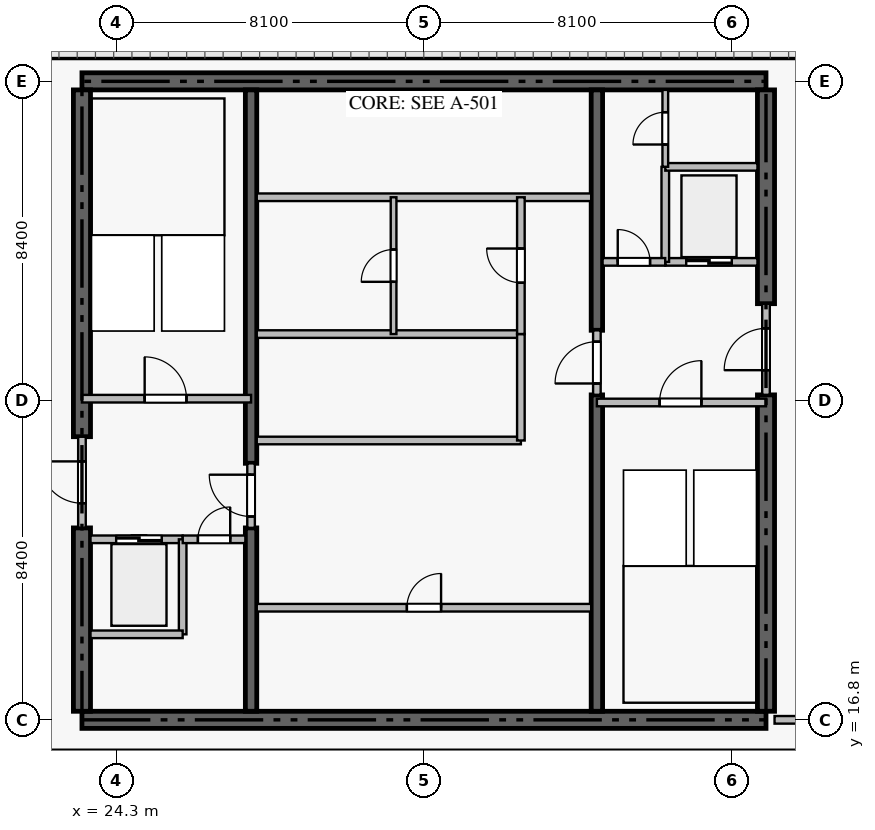
"""IFC4 building model, lengths in metres.
Left out: names, types, materials, properties, quantities, classifications, styles, units other than length and angle.
Written with IfcOpenShell. Run it as: python <this file> out.ifc"""

import sys

from ifc_helpers import new_model, si_unit, direction, frame, frame_2d, origin, place, context, subcontext, project, spatial, rectangle, extrude, source, transform, mapped, element, fill, save


model = new_model("IFC4")
c1 = context("Model", 3, precision=1e-05, world=origin(), true_north=direction((0.0, 1.0)))
c2 = subcontext(c1, "Body", "Model", "MODEL_VIEW")
j1 = project(units=[si_unit("LENGTHUNIT", "METRE"), si_unit("PLANEANGLEUNIT", "RADIAN")], contexts=[c1])
p1 = place(None, origin())
s1 = spatial("IfcSite", under=j1, at=p1, CompositionType="ELEMENT")
p2 = place(p1, origin())
s2 = spatial("IfcBuilding", under=s1, at=p2, CompositionType="ELEMENT")
p3 = place(p2, frame((0.0, 0.0, -10.8)))
s3 = spatial("IfcBuildingStorey", under=s2, at=p3, CompositionType="ELEMENT", Elevation=-10.8)
for number, where, z_axis, x_axis in (
    (1, (23.4, 16.8, 0.0), (0.0, 0.0, 1.0), (1.0, 0.0, 0.0)),
    (2, (41.4, 33.6, 0.0), (0.0, 0.0, 1.0), (-1.0, 0.0, 0.0)),
):
    element("IfcWall", number, at=place(p3, frame(where, z_axis=z_axis, x_axis=x_axis)), inside=s3, PredefinedType="SHEAR", context=c2, shape_type="SweptSolid", body=[
        extrude(rectangle(XDim=18.0, YDim=0.45, at=frame_2d((9.0, 0.0))), origin(), (0.0, 0.0, 1.0), 3.238),
    ])
p4 = place(p3, frame((23.4, 17.025, 0.0), z_axis=(0.0, 0.0, 1.0), x_axis=(0.0, 1.0, 0.0)))
e3 = element("IfcWall", 3, at=p4, inside=s3, PredefinedType="SHEAR", context=c2, shape_type="SweptSolid", body=[
    extrude(rectangle(XDim=4.825, YDim=0.45, at=frame_2d((2.413, 0.0))), origin(), (0.0, 0.0, 1.0), 3.238),
])
p5 = place(p3, frame((23.4, 24.25, 0.0), z_axis=(0.0, 0.0, 1.0), x_axis=(0.0, 1.0, 0.0)))
e4 = element("IfcWall", 4, at=p5, inside=s3, PredefinedType="SHEAR", context=c2, shape_type="SweptSolid", body=[
    extrude(rectangle(XDim=9.125, YDim=0.45, at=frame_2d((4.562, 0.0))), origin(), (0.0, 0.0, 1.0), 3.238),
])
p6 = place(p3, frame((41.4, 17.025, 0.0), z_axis=(0.0, 0.0, 1.0), x_axis=(0.0, 1.0, 0.0)))
e5 = element("IfcWall", 5, at=p6, inside=s3, PredefinedType="SHEAR", context=c2, shape_type="SweptSolid", body=[
    extrude(rectangle(XDim=8.325, YDim=0.45, at=frame_2d((4.163, 0.0))), origin(), (0.0, 0.0, 1.0), 3.238),
])
p7 = place(p3, frame((41.4, 27.75, 0.0), z_axis=(0.0, 0.0, 1.0), x_axis=(0.0, 1.0, 0.0)))
e6 = element("IfcWall", 6, at=p7, inside=s3, PredefinedType="SHEAR", context=c2, shape_type="SweptSolid", body=[
    extrude(rectangle(XDim=5.625, YDim=0.45, at=frame_2d((2.812, 0.0))), origin(), (0.0, 0.0, 1.0), 3.238),
])
p8 = place(p3, frame((27.85, 17.025, 0.0), z_axis=(0.0, 0.0, 1.0), x_axis=(0.0, 1.0, 0.0)))
e7 = element("IfcWall", 7, at=p8, inside=s3, PredefinedType="SHEAR", context=c2, shape_type="SweptSolid", body=[
    extrude(rectangle(XDim=4.825, YDim=0.3, at=frame_2d((2.413, 0.0))), origin(), (0.0, 0.0, 1.0), 3.238),
])
p9 = place(p3, frame((27.85, 23.55, 0.0), z_axis=(0.0, 0.0, 1.0), x_axis=(0.0, 1.0, 0.0)))
e8 = element("IfcWall", 8, at=p9, inside=s3, PredefinedType="SHEAR", context=c2, shape_type="SweptSolid", body=[
    extrude(rectangle(XDim=9.825, YDim=0.3, at=frame_2d((4.913, 0.0))), origin(), (0.0, 0.0, 1.0), 3.238),
])
p10 = place(p3, frame((36.95, 17.025, 0.0), z_axis=(0.0, 0.0, 1.0), x_axis=(0.0, 1.0, 0.0)))
e9 = element("IfcWall", 9, at=p10, inside=s3, PredefinedType="SHEAR", context=c2, shape_type="SweptSolid", body=[
    extrude(rectangle(XDim=8.325, YDim=0.3, at=frame_2d((4.163, 0.0))), origin(), (0.0, 0.0, 1.0), 3.238),
])
p11 = place(p3, frame((36.95, 27.05, 0.0), z_axis=(0.0, 0.0, 1.0), x_axis=(0.0, 1.0, 0.0)))
e10 = element("IfcWall", 10, at=p11, inside=s3, PredefinedType="SHEAR", context=c2, shape_type="SweptSolid", body=[
    extrude(rectangle(XDim=6.325, YDim=0.3, at=frame_2d((3.163, 0.0))), origin(), (0.0, 0.0, 1.0), 3.238),
])
p12 = place(p3, frame((23.4, 25.25, 0.0), z_axis=(0.0, 0.0, 1.0), x_axis=(1.0, 0.0, 0.0)))
e11 = element("IfcWall", 11, at=p12, inside=s3, PredefinedType="STANDARD", context=c2, shape_type="SweptSolid", body=[
    extrude(rectangle(XDim=4.45, YDim=0.2, at=frame_2d((2.225, 0.0))), origin(), (0.0, 0.0, 1.0), 3.24),
])
p13 = place(p12, frame((1.65, 0.0, 0.0)))
e12 = element("IfcOpeningElement", 12, at=p13, cuts=e11, PredefinedType="OPENING", context=c2, shape_type="SweptSolid", body=[
    extrude(rectangle(XDim=1.1, YDim=2.15, at=frame_2d((0.55, 1.075))), frame((0.0, 0.11, 0.0), z_axis=(0.0, -1.0, 0.0), x_axis=(1.0, 0.0, 0.0)), (0.0, 0.0, 1.0), 0.22),
])
p14 = place(p3, frame((36.95, 25.15, 0.0), z_axis=(0.0, 0.0, 1.0), x_axis=(1.0, 0.0, 0.0)))
e13 = element("IfcWall", 13, at=p14, inside=s3, PredefinedType="STANDARD", context=c2, shape_type="SweptSolid", body=[
    extrude(rectangle(XDim=4.45, YDim=0.2, at=frame_2d((2.225, 0.0))), origin(), (0.0, 0.0, 1.0), 3.24),
])
p15 = place(p14, frame((1.65, 0.0, 0.0)))
e14 = element("IfcOpeningElement", 14, at=p15, cuts=e13, PredefinedType="OPENING", context=c2, shape_type="SweptSolid", body=[
    extrude(rectangle(XDim=1.1, YDim=2.15, at=frame_2d((0.55, 1.075))), frame((0.0, 0.11, 0.0), z_axis=(0.0, -1.0, 0.0), x_axis=(1.0, 0.0, 0.0)), (0.0, 0.0, 1.0), 0.22),
])
p16 = place(p3, frame((23.625, 21.55, 0.0), z_axis=(0.0, 0.0, 1.0), x_axis=(1.0, 0.0, 0.0)))
e15 = element("IfcWall", 15, at=p16, inside=s3, PredefinedType="STANDARD", context=c2, shape_type="SweptSolid", body=[
    extrude(rectangle(XDim=2.425, YDim=0.2, at=frame_2d((1.212, 0.0))), origin(), (0.0, 0.0, 1.0), 3.24),
])
p17 = place(p16, frame((0.675, 0.0, 0.0)))
e16 = element("IfcOpeningElement", 16, at=p17, cuts=e15, PredefinedType="OPENING", context=c2, shape_type="SweptSolid", body=[
    extrude(rectangle(XDim=1.2, YDim=2.2, at=frame_2d((0.6, 1.1))), frame((0.0, 0.11, 0.0), z_axis=(0.0, -1.0, 0.0), x_axis=(1.0, 0.0, 0.0)), (0.0, 0.0, 1.0), 0.22),
])
p18 = place(p3, frame((38.75, 28.85, 0.0), z_axis=(0.0, 0.0, 1.0), x_axis=(1.0, 0.0, 0.0)))
e17 = element("IfcWall", 17, at=p18, inside=s3, PredefinedType="STANDARD", context=c2, shape_type="SweptSolid", body=[
    extrude(rectangle(XDim=2.425, YDim=0.2, at=frame_2d((1.212, 0.0))), origin(), (0.0, 0.0, 1.0), 3.24),
])
p19 = place(p18, frame((0.55, 0.0, 0.0)))
e18 = element("IfcOpeningElement", 18, at=p19, cuts=e17, PredefinedType="OPENING", context=c2, shape_type="SweptSolid", body=[
    extrude(rectangle(XDim=1.2, YDim=2.2, at=frame_2d((0.6, 1.1))), frame((0.0, 0.11, 0.0), z_axis=(0.0, -1.0, 0.0), x_axis=(1.0, 0.0, 0.0)), (0.0, 0.0, 1.0), 0.22),
])
p20 = place(p3, frame((26.05, 19.05, 0.0), z_axis=(0.0, 0.0, 1.0), x_axis=(0.0, 1.0, 0.0)))
e19 = element("IfcWall", 19, at=p20, inside=s3, PredefinedType="STANDARD", context=c2, shape_type="SweptSolid", body=[
    extrude(rectangle(XDim=2.5, YDim=0.2, at=frame_2d((1.25, 0.0))), origin(), (0.0, 0.0, 1.0), 3.24),
])
p21 = place(p3, frame((23.625, 19.05, 0.0), z_axis=(0.0, 0.0, 1.0), x_axis=(1.0, 0.0, 0.0)))
e20 = element("IfcWall", 20, at=p21, inside=s3, PredefinedType="STANDARD", context=c2, shape_type="SweptSolid", body=[
    extrude(rectangle(XDim=2.425, YDim=0.2, at=frame_2d((1.212, 0.0))), origin(), (0.0, 0.0, 1.0), 3.24),
])
p22 = place(p3, frame((26.052, 21.55, 0.0), z_axis=(0.0, 0.0, 1.0), x_axis=(1.0, 0.0, 0.0)))
e21 = element("IfcWall", 21, at=p22, inside=s3, PredefinedType="STANDARD", context=c2, shape_type="SweptSolid", body=[
    extrude(rectangle(XDim=1.648, YDim=0.2, at=frame_2d((0.824, 0.0))), origin(), (0.0, 0.0, 1.0), 3.24),
])
p23 = place(p22, frame((0.399, 0.0, 0.0)))
e22 = element("IfcOpeningElement", 22, at=p23, cuts=e21, PredefinedType="OPENING", context=c2, shape_type="SweptSolid", body=[
    extrude(rectangle(XDim=0.85, YDim=2.1, at=frame_2d((0.425, 1.05))), frame((0.0, 0.11, 0.0), z_axis=(0.0, -1.0, 0.0), x_axis=(1.0, 0.0, 0.0)), (0.0, 0.0, 1.0), 0.22),
])
p24 = place(p3, frame((38.75, 28.85, 0.0), z_axis=(0.0, 0.0, 1.0), x_axis=(0.0, 1.0, 0.0)))
e23 = element("IfcWall", 23, at=p24, inside=s3, PredefinedType="STANDARD", context=c2, shape_type="SweptSolid", body=[
    extrude(rectangle(XDim=2.5, YDim=0.2, at=frame_2d((1.25, 0.0))), origin(), (0.0, 0.0, 1.0), 3.24),
])
p25 = place(p3, frame((38.75, 31.35, 0.0), z_axis=(0.0, 0.0, 1.0), x_axis=(1.0, 0.0, 0.0)))
e24 = element("IfcWall", 24, at=p25, inside=s3, PredefinedType="STANDARD", context=c2, shape_type="SweptSolid", body=[
    extrude(rectangle(XDim=2.425, YDim=0.2, at=frame_2d((1.212, 0.0))), origin(), (0.0, 0.0, 1.0), 3.24),
])
p26 = place(p3, frame((37.1, 28.85, 0.0), z_axis=(0.0, 0.0, 1.0), x_axis=(1.0, 0.0, 0.0)))
e25 = element("IfcWall", 25, at=p26, inside=s3, PredefinedType="STANDARD", context=c2, shape_type="SweptSolid", body=[
    extrude(rectangle(XDim=1.648, YDim=0.2, at=frame_2d((0.824, 0.0))), origin(), (0.0, 0.0, 1.0), 3.24),
])
p27 = place(p26, frame((0.399, 0.0, 0.0)))
e26 = element("IfcOpeningElement", 26, at=p27, cuts=e25, PredefinedType="OPENING", context=c2, shape_type="SweptSolid", body=[
    extrude(rectangle(XDim=0.85, YDim=2.1, at=frame_2d((0.425, 1.05))), frame((0.0, 0.11, 0.0), z_axis=(0.0, -1.0, 0.0), x_axis=(1.0, 0.0, 0.0)), (0.0, 0.0, 1.0), 0.22),
])
p28 = place(p3, frame((23.4, 21.852, 0.0), z_axis=(0.0, 0.0, 1.0), x_axis=(0.0, 1.0, 0.0)))
e27 = element("IfcWall", 27, at=p28, inside=s3, PredefinedType="STANDARD", context=c2, shape_type="SweptSolid", body=[
    extrude(rectangle(XDim=2.396, YDim=0.2, at=frame_2d((1.198, 0.0))), origin(), (0.0, 0.0, 1.0), 3.24),
])
p29 = place(p28, frame((0.648, 0.0, 0.0)))
e28 = element("IfcOpeningElement", 28, at=p29, cuts=e27, PredefinedType="OPENING", context=c2, shape_type="SweptSolid", body=[
    extrude(rectangle(XDim=1.1, YDim=2.15, at=frame_2d((0.55, 1.075))), frame((0.0, 0.11, 0.0), z_axis=(0.0, -1.0, 0.0), x_axis=(1.0, 0.0, 0.0)), (0.0, 0.0, 1.0), 0.22),
])
p30 = place(p3, frame((41.4, 25.352, 0.0), z_axis=(0.0, 0.0, 1.0), x_axis=(0.0, 1.0, 0.0)))
e29 = element("IfcWall", 29, at=p30, inside=s3, PredefinedType="STANDARD", context=c2, shape_type="SweptSolid", body=[
    extrude(rectangle(XDim=2.396, YDim=0.2, at=frame_2d((1.198, 0.0))), origin(), (0.0, 0.0, 1.0), 3.24),
])
p31 = place(p30, frame((0.648, 0.0, 0.0)))
e30 = element("IfcOpeningElement", 30, at=p31, cuts=e29, PredefinedType="OPENING", context=c2, shape_type="SweptSolid", body=[
    extrude(rectangle(XDim=1.1, YDim=2.15, at=frame_2d((0.55, 1.075))), frame((0.0, 0.11, 0.0), z_axis=(0.0, -1.0, 0.0), x_axis=(1.0, 0.0, 0.0)), (0.0, 0.0, 1.0), 0.22),
])
p32 = place(p3, frame((27.85, 21.852, 0.0), z_axis=(0.0, 0.0, 1.0), x_axis=(0.0, 1.0, 0.0)))
e31 = element("IfcWall", 31, at=p32, inside=s3, PredefinedType="STANDARD", context=c2, shape_type="SweptSolid", body=[
    extrude(rectangle(XDim=1.696, YDim=0.2, at=frame_2d((0.848, 0.0))), origin(), (0.0, 0.0, 1.0), 3.24),
])
p33 = place(p32, frame((0.298, 0.0, 0.0)))
e32 = element("IfcOpeningElement", 32, at=p33, cuts=e31, PredefinedType="OPENING", context=c2, shape_type="SweptSolid", body=[
    extrude(rectangle(XDim=1.1, YDim=2.15, at=frame_2d((0.55, 1.075))), frame((0.0, 0.11, 0.0), z_axis=(0.0, -1.0, 0.0), x_axis=(1.0, 0.0, 0.0)), (0.0, 0.0, 1.0), 0.22),
])
p34 = place(p3, frame((36.95, 25.352, 0.0), z_axis=(0.0, 0.0, 1.0), x_axis=(0.0, 1.0, 0.0)))
e33 = element("IfcWall", 33, at=p34, inside=s3, PredefinedType="STANDARD", context=c2, shape_type="SweptSolid", body=[
    extrude(rectangle(XDim=1.696, YDim=0.2, at=frame_2d((0.848, 0.0))), origin(), (0.0, 0.0, 1.0), 3.24),
])
p35 = place(p34, frame((0.298, 0.0, 0.0)))
e34 = element("IfcOpeningElement", 34, at=p35, cuts=e33, PredefinedType="OPENING", context=c2, shape_type="SweptSolid", body=[
    extrude(rectangle(XDim=1.1, YDim=2.15, at=frame_2d((0.55, 1.075))), frame((0.0, 0.11, 0.0), z_axis=(0.0, -1.0, 0.0), x_axis=(1.0, 0.0, 0.0)), (0.0, 0.0, 1.0), 0.22),
])
p36 = place(p3, frame((28.0, 30.55, 0.0), z_axis=(0.0, 0.0, 1.0), x_axis=(1.0, 0.0, 0.0)))
e35 = element("IfcWall", 35, at=p36, inside=s3, PredefinedType="STANDARD", context=c2, shape_type="SweptSolid", body=[
    extrude(rectangle(XDim=8.8, YDim=0.2, at=frame_2d((4.4, 0.0))), origin(), (0.0, 0.0, 1.0), 3.24),
])
p37 = place(p3, frame((28.0, 19.75, 0.0), z_axis=(0.0, 0.0, 1.0), x_axis=(1.0, 0.0, 0.0)))
e36 = element("IfcWall", 36, at=p37, inside=s3, PredefinedType="STANDARD", context=c2, shape_type="SweptSolid", body=[
    extrude(rectangle(XDim=8.8, YDim=0.2, at=frame_2d((4.4, 0.0))), origin(), (0.0, 0.0, 1.0), 3.24),
])
p38 = place(p37, frame((3.95, 0.0, 0.0)))
e37 = element("IfcOpeningElement", 37, at=p38, cuts=e36, PredefinedType="OPENING", context=c2, shape_type="SweptSolid", body=[
    extrude(rectangle(XDim=0.9, YDim=2.1, at=frame_2d((0.45, 1.05))), frame((0.0, 0.11, 0.0), z_axis=(0.0, -1.0, 0.0), x_axis=(1.0, 0.0, 0.0)), (0.0, 0.0, 1.0), 0.22),
])
for number, where, z_axis, x_axis in (
    (38, (28.0, 24.15, 0.0), (0.0, 0.0, 1.0), (1.0, 0.0, 0.0)),
    (39, (28.0, 26.95, 0.0), (0.0, 0.0, 1.0), (1.0, 0.0, 0.0)),
):
    element("IfcWall", number, at=place(p3, frame(where, z_axis=z_axis, x_axis=x_axis)), inside=s3, PredefinedType="STANDARD", context=c2, shape_type="SweptSolid", body=[
        extrude(rectangle(XDim=6.95, YDim=0.2, at=frame_2d((3.475, 0.0))), origin(), (0.0, 0.0, 1.0), 3.24),
    ])
p39 = place(p3, frame((34.95, 24.15, 0.0), z_axis=(0.0, 0.0, 1.0), x_axis=(0.0, 1.0, 0.0)))
e40 = element("IfcWall", 40, at=p39, inside=s3, PredefinedType="STANDARD", context=c2, shape_type="SweptSolid", body=[
    extrude(rectangle(XDim=2.8, YDim=0.2, at=frame_2d((1.4, 0.0))), origin(), (0.0, 0.0, 1.0), 3.24),
])
p40 = place(p3, frame((38.75, 31.352, 0.0), z_axis=(0.0, 0.0, 1.0), x_axis=(0.0, 1.0, 0.0)))
e41 = element("IfcWall", 41, at=p40, inside=s3, PredefinedType="PARTITIONING", context=c2, shape_type="SweptSolid", body=[
    extrude(rectangle(XDim=2.023, YDim=0.15, at=frame_2d((1.011, 0.0))), origin(), (0.0, 0.0, 1.0), 3.24),
])
p41 = place(p40, frame((0.586, 0.0, 0.0)))
e42 = element("IfcOpeningElement", 42, at=p41, cuts=e41, PredefinedType="OPENING", context=c2, shape_type="SweptSolid", body=[
    extrude(rectangle(XDim=0.85, YDim=2.1, at=frame_2d((0.425, 1.05))), frame((0.0, 0.085, 0.0), z_axis=(0.0, -1.0, 0.0), x_axis=(1.0, 0.0, 0.0)), (0.0, 0.0, 1.0), 0.17),
])
p42 = place(p3, frame((34.95, 26.952, 0.0), z_axis=(0.0, 0.0, 1.0), x_axis=(0.0, 1.0, 0.0)))
e43 = element("IfcWall", 43, at=p42, inside=s3, PredefinedType="STANDARD", context=c2, shape_type="SweptSolid", body=[
    extrude(rectangle(XDim=3.598, YDim=0.2, at=frame_2d((1.799, 0.0))), origin(), (0.0, 0.0, 1.0), 3.24),
])
p43 = place(p42, frame((1.349, 0.0, 0.0)))
e44 = element("IfcOpeningElement", 44, at=p43, cuts=e43, PredefinedType="OPENING", context=c2, shape_type="SweptSolid", body=[
    extrude(rectangle(XDim=0.9, YDim=2.1, at=frame_2d((0.45, 1.05))), frame((0.0, 0.11, 0.0), z_axis=(0.0, -1.0, 0.0), x_axis=(1.0, 0.0, 0.0)), (0.0, 0.0, 1.0), 0.22),
])
p44 = place(p3, frame((31.6, 26.95, 0.0), z_axis=(0.0, 0.0, 1.0), x_axis=(0.0, 1.0, 0.0)))
e45 = element("IfcWall", 45, at=p44, inside=s3, PredefinedType="PARTITIONING", context=c2, shape_type="SweptSolid", body=[
    extrude(rectangle(XDim=3.6, YDim=0.15, at=frame_2d((1.8, 0.0))), origin(), (0.0, 0.0, 1.0), 3.24),
])
p45 = place(p44, frame((1.375, 0.0, 0.0)))
e46 = element("IfcOpeningElement", 46, at=p45, cuts=e45, PredefinedType="OPENING", context=c2, shape_type="SweptSolid", body=[
    extrude(rectangle(XDim=0.85, YDim=2.1, at=frame_2d((0.425, 1.05))), frame((0.0, 0.085, 0.0), z_axis=(0.0, -1.0, 0.0), x_axis=(1.0, 0.0, 0.0)), (0.0, 0.0, 1.0), 0.17),
])
p46 = place(p3, frame((41.625, 16.8, 0.0), z_axis=(0.0, 0.0, 1.0), x_axis=(1.0, 0.0, 0.0)))
e47 = element("IfcWall", 47, at=p46, inside=s3, PredefinedType="STANDARD", context=c2, shape_type="SweptSolid", body=[
    extrude(rectangle(XDim=22.725, YDim=0.2, at=frame_2d((11.363, 0.0))), origin(), (0.0, 0.0, 1.0), 2.672),
])
p47 = place(p46, frame((4.697, 0.0, 0.0)))
e48 = element("IfcOpeningElement", 48, at=p47, cuts=e47, PredefinedType="OPENING", context=c2, shape_type="SweptSolid", body=[
    extrude(rectangle(XDim=3.8, YDim=2.5, at=frame_2d((1.9, 1.25))), frame((0.0, 0.11, 0.0), z_axis=(0.0, -1.0, 0.0), x_axis=(1.0, 0.0, 0.0)), (0.0, 0.0, 1.0), 0.22),
])
m1 = source(origin(), c2, "Body", "SweptSolid", [
    extrude(rectangle(XDim=1.1, YDim=2.15, at=frame_2d((0.55, 1.075))), frame((0.0, 0.025, 0.0), z_axis=(0.0, -1.0, 0.0), x_axis=(1.0, 0.0, 0.0)), (0.0, 0.0, 1.0), 0.05),
])
p48 = place(p13, origin())
e49 = element("IfcDoor", 49, at=p48, inside=s3, OperationType="SINGLE_SWING_LEFT", PredefinedType="DOOR", context=c2, shape_type="MappedRepresentation", body=[
    mapped(m1, transform((0.0, 0.0, 0.0), scale=1.0)),
])
fill(e12, e49)
p49 = place(p15, origin())
e50 = element("IfcDoor", 50, at=p49, inside=s3, OperationType="SINGLE_SWING_RIGHT", PredefinedType="DOOR", context=c2, shape_type="MappedRepresentation", body=[
    mapped(m1, transform((0.0, 0.0, 0.0), scale=1.0)),
])
fill(e14, e50)
m2 = source(origin(), c2, "Body", "SweptSolid", [
    extrude(rectangle(XDim=1.2, YDim=2.2, at=frame_2d((0.6, 1.1))), frame((0.0, 0.025, 0.0), z_axis=(0.0, -1.0, 0.0), x_axis=(1.0, 0.0, 0.0)), (0.0, 0.0, 1.0), 0.05),
])
p50 = place(p17, origin())
e51 = element("IfcDoor", 51, at=p50, inside=s3, OperationType="DOUBLE_DOOR_SLIDING", PredefinedType="DOOR", context=c2, shape_type="MappedRepresentation", body=[
    mapped(m2, transform((0.0, 0.0, 0.0), scale=1.0)),
])
fill(e16, e51)
p51 = place(p19, origin())
e52 = element("IfcDoor", 52, at=p51, inside=s3, OperationType="DOUBLE_DOOR_SLIDING", PredefinedType="DOOR", context=c2, shape_type="MappedRepresentation", body=[
    mapped(m2, transform((0.0, 0.0, 0.0), scale=1.0)),
])
fill(e18, e52)
m3 = source(origin(), c2, "Body", "SweptSolid", [
    extrude(rectangle(XDim=0.85, YDim=2.1, at=frame_2d((0.425, 1.05))), frame((0.0, 0.025, 0.0), z_axis=(0.0, -1.0, 0.0), x_axis=(1.0, 0.0, 0.0)), (0.0, 0.0, 1.0), 0.05),
])
p52 = place(p23, origin())
e53 = element("IfcDoor", 53, at=p52, inside=s3, OperationType="SINGLE_SWING_RIGHT", PredefinedType="DOOR", context=c2, shape_type="MappedRepresentation", body=[
    mapped(m3, transform((0.0, 0.0, 0.0), scale=1.0)),
])
fill(e22, e53)
p53 = place(p27, origin())
e54 = element("IfcDoor", 54, at=p53, inside=s3, OperationType="SINGLE_SWING_LEFT", PredefinedType="DOOR", context=c2, shape_type="MappedRepresentation", body=[
    mapped(m3, transform((0.0, 0.0, 0.0), scale=1.0)),
])
fill(e26, e54)
p54 = place(p29, origin())
e55 = element("IfcDoor", 55, at=p54, inside=s3, OperationType="SINGLE_SWING_RIGHT", PredefinedType="DOOR", context=c2, shape_type="MappedRepresentation", body=[
    mapped(m1, transform((0.0, 0.0, 0.0), scale=1.0)),
])
fill(e28, e55)
p55 = place(p31, origin())
e56 = element("IfcDoor", 56, at=p55, inside=s3, OperationType="SINGLE_SWING_LEFT", PredefinedType="DOOR", context=c2, shape_type="MappedRepresentation", body=[
    mapped(m1, transform((0.0, 0.0, 0.0), scale=1.0)),
])
fill(e30, e56)
p56 = place(p33, origin())
e57 = element("IfcDoor", 57, at=p56, inside=s3, OperationType="SINGLE_SWING_RIGHT", PredefinedType="DOOR", context=c2, shape_type="MappedRepresentation", body=[
    mapped(m1, transform((0.0, 0.0, 0.0), scale=1.0)),
])
fill(e32, e57)
p57 = place(p35, origin())
e58 = element("IfcDoor", 58, at=p57, inside=s3, OperationType="SINGLE_SWING_LEFT", PredefinedType="DOOR", context=c2, shape_type="MappedRepresentation", body=[
    mapped(m1, transform((0.0, 0.0, 0.0), scale=1.0)),
])
fill(e34, e58)
m4 = source(origin(), c2, "Body", "SweptSolid", [
    extrude(rectangle(XDim=0.9, YDim=2.1, at=frame_2d((0.45, 1.05))), frame((0.0, 0.025, 0.0), z_axis=(0.0, -1.0, 0.0), x_axis=(1.0, 0.0, 0.0)), (0.0, 0.0, 1.0), 0.05),
])
p58 = place(p38, origin())
e59 = element("IfcDoor", 59, at=p58, inside=s3, OperationType="SINGLE_SWING_RIGHT", PredefinedType="DOOR", context=c2, shape_type="MappedRepresentation", body=[
    mapped(m4, transform((0.0, 0.0, 0.0), scale=1.0)),
])
fill(e37, e59)
p59 = place(p41, origin())
e60 = element("IfcDoor", 60, at=p59, inside=s3, OperationType="SINGLE_SWING_LEFT", PredefinedType="DOOR", context=c2, shape_type="MappedRepresentation", body=[
    mapped(m3, transform((0.0, 0.0, 0.0), scale=1.0)),
])
fill(e42, e60)
p60 = place(p43, origin())
e61 = element("IfcDoor", 61, at=p60, inside=s3, OperationType="SINGLE_SWING_RIGHT", PredefinedType="DOOR", context=c2, shape_type="MappedRepresentation", body=[
    mapped(m4, transform((0.0, 0.0, 0.0), scale=1.0)),
])
fill(e44, e61)
p61 = place(p45, origin())
e62 = element("IfcDoor", 62, at=p61, inside=s3, OperationType="SINGLE_SWING_LEFT", PredefinedType="DOOR", context=c2, shape_type="MappedRepresentation", body=[
    mapped(m3, transform((0.0, 0.0, 0.0), scale=1.0)),
])
fill(e46, e62)
save(model, sys.argv[1])
